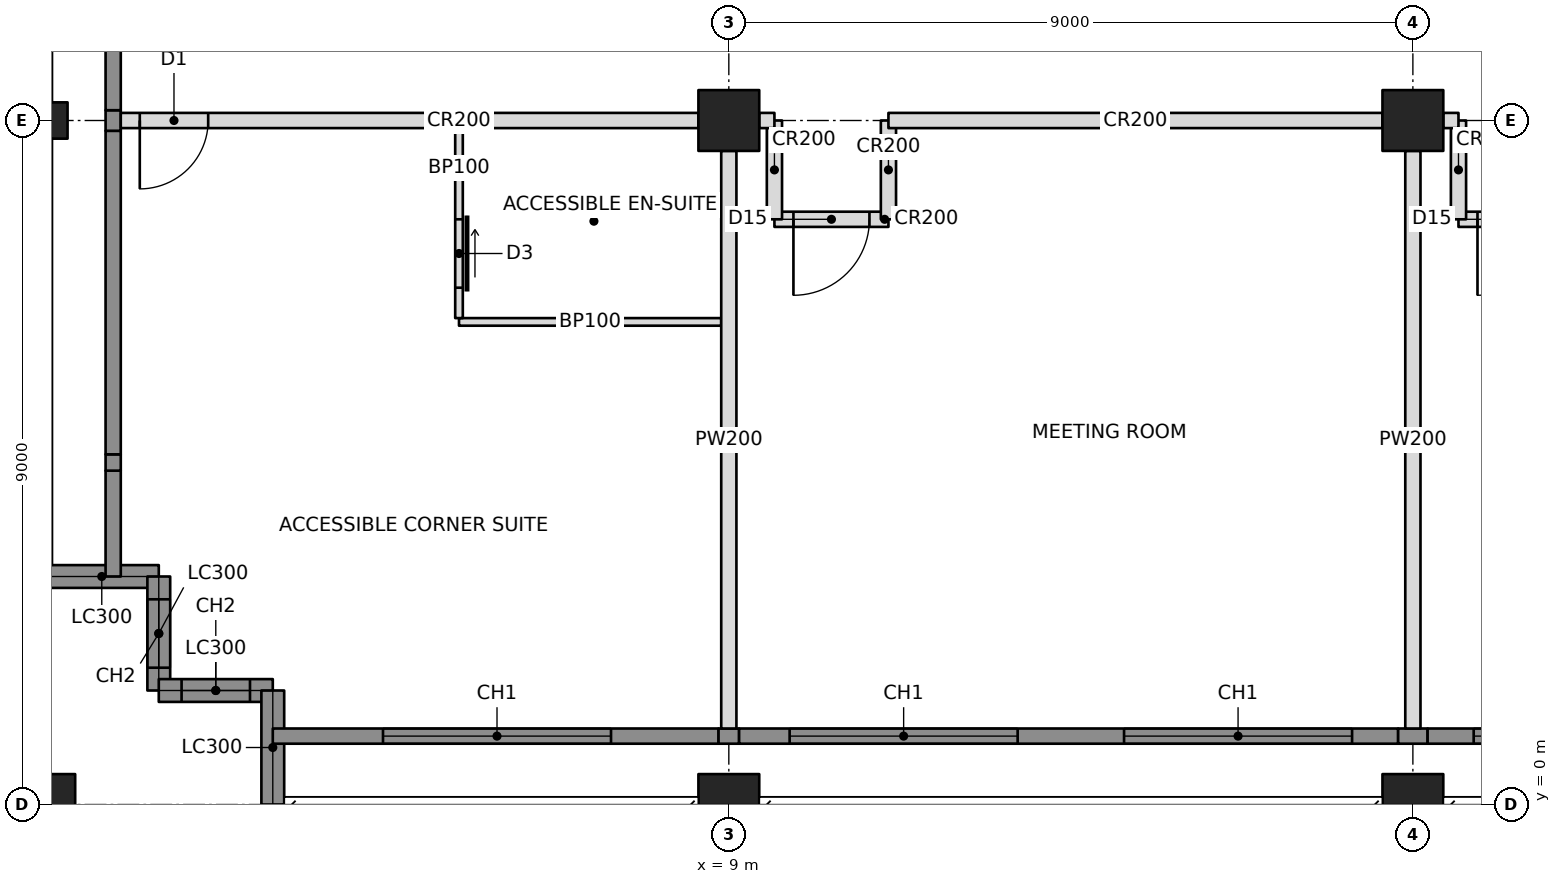
"""IFC4 building model, lengths in metres.
Left out: names, types, materials, properties, quantities, classifications, styles, units other than length and angle.
Written with IfcOpenShell. Run it as: python <this file> out.ifc"""

import sys

from ifc_helpers import new_model, si_unit, direction, frame, frame_2d, origin, origin_with_axes, origin_2d, place, context, subcontext, project, spatial, rectangle, hollow_rectangle, i_section, extrude, element, fill, save


model = new_model("IFC4")
c1 = context("Model", 3, precision=1e-05, world=origin(), true_north=direction((0.0, 1.0)))
c2 = subcontext(c1, "Body", "Model", "MODEL_VIEW")
j1 = project(units=[si_unit("LENGTHUNIT", "METRE"), si_unit("PLANEANGLEUNIT", "RADIAN")], contexts=[c1])
p1 = place(None, origin())
s1 = spatial("IfcSite", under=j1, at=p1, CompositionType="ELEMENT")
p2 = place(p1, origin())
s2 = spatial("IfcBuilding", under=s1, at=p2, CompositionType="ELEMENT")
p3 = place(p2, frame((0.0, 0.0, 28.0)))
s3 = spatial("IfcBuildingStorey", under=s2, at=p3, CompositionType="ELEMENT", Elevation=28.0)
p4 = place(p3, origin_with_axes())
e1 = element("IfcColumn", 1, at=p4, inside=s3, PredefinedType="COLUMN", context=c2, shape_type="SweptSolid", body=[
    extrude(hollow_rectangle(XDim=0.8, YDim=0.8, WallThickness=0.1, at=origin_2d()), origin(), (0.0, 0.0, 1.0), 3.4),
])
p5 = place(p3, frame((0.0, 9.0, 0.0), z_axis=(0.0, 0.0, 1.0), x_axis=(0.0, 1.0, 0.0)))
e2 = element("IfcColumn", 2, at=p5, inside=s3, PredefinedType="COLUMN", context=c2, shape_type="SweptSolid", body=[
    extrude(i_section(OverallWidth=0.478, OverallDepth=0.599, WebThickness=0.1, FlangeThickness=0.14, at=origin_2d()), origin(), (0.0, 0.0, 1.0), 3.4),
])
for number, where, z_axis, x_axis in (
    (3, (9.0, 0.0, 0.0), (0.0, 0.0, 1.0), (1.0, 0.0, 0.0)),
    (4, (9.0, 9.0, 0.0), (0.0, 0.0, 1.0), (1.0, 0.0, 0.0)),
    (5, (18.0, 0.0, 0.0), (0.0, 0.0, 1.0), (1.0, 0.0, 0.0)),
    (6, (18.0, 9.0, 0.0), (0.0, 0.0, 1.0), (1.0, 0.0, 0.0)),
):
    element("IfcColumn", number, at=place(p3, frame(where, z_axis=z_axis, x_axis=x_axis)), inside=s3, PredefinedType="COLUMN", context=c2, shape_type="SweptSolid", body=[
        extrude(hollow_rectangle(XDim=0.8, YDim=0.8, WallThickness=0.1, at=origin_2d()), origin(), (0.0, 0.0, 1.0), 3.4),
    ])
p6 = place(p3, frame((0.0, 3.0, 0.0), z_axis=(0.0, 0.0, 1.0), x_axis=(1.0, 0.0, 0.0)))
e7 = element("IfcWall", 7, at=p6, inside=s3, PredefinedType="SOLIDWALL", context=c2, shape_type="SweptSolid", body=[
    extrude(rectangle(XDim=1.5, YDim=0.3, at=frame_2d((0.75, 0.0))), origin(), (0.0, 0.0, 1.0), 2.42),
])
p7 = place(p3, frame((1.5, 3.0, 0.0), z_axis=(0.0, 0.0, 1.0), x_axis=(0.0, -1.0, 0.0)))
e8 = element("IfcWall", 8, at=p7, inside=s3, PredefinedType="SOLIDWALL", context=c2, shape_type="SweptSolid", body=[
    extrude(rectangle(XDim=1.5, YDim=0.3, at=frame_2d((0.75, 0.0))), origin(), (0.0, 0.0, 1.0), 3.2),
])
p8 = place(p7, frame((0.3, 0.0, 0.6)))
e9 = element("IfcOpeningElement", 9, at=p8, cuts=e8, PredefinedType="OPENING", context=c2, shape_type="SweptSolid", body=[
    extrude(rectangle(XDim=0.9, YDim=2.2, at=frame_2d((0.45, 1.1))), frame((0.0, 0.16, 0.0), z_axis=(0.0, -1.0, 0.0), x_axis=(1.0, 0.0, 0.0)), (0.0, 0.0, 1.0), 0.32),
])
p9 = place(p3, frame((1.5, 1.5, 0.0), z_axis=(0.0, 0.0, 1.0), x_axis=(1.0, 0.0, 0.0)))
e10 = element("IfcWall", 10, at=p9, inside=s3, PredefinedType="SOLIDWALL", context=c2, shape_type="SweptSolid", body=[
    extrude(rectangle(XDim=1.5, YDim=0.3, at=frame_2d((0.75, 0.0))), origin(), (0.0, 0.0, 1.0), 3.2),
])
p10 = place(p9, frame((0.3, 0.0, 0.6)))
e11 = element("IfcOpeningElement", 11, at=p10, cuts=e10, PredefinedType="OPENING", context=c2, shape_type="SweptSolid", body=[
    extrude(rectangle(XDim=0.9, YDim=2.2, at=frame_2d((0.45, 1.1))), frame((0.0, 0.16, 0.0), z_axis=(0.0, -1.0, 0.0), x_axis=(1.0, 0.0, 0.0)), (0.0, 0.0, 1.0), 0.32),
])
p11 = place(p3, frame((3.0, 1.5, 0.0), z_axis=(0.0, 0.0, 1.0), x_axis=(0.0, -1.0, 0.0)))
e12 = element("IfcWall", 12, at=p11, inside=s3, PredefinedType="SOLIDWALL", context=c2, shape_type="SweptSolid", body=[
    extrude(rectangle(XDim=1.5, YDim=0.3, at=frame_2d((0.75, 0.0))), origin(), (0.0, 0.0, 1.0), 2.42),
])
p12 = place(p3, frame((3.0, 0.9, 0.0), z_axis=(0.0, 0.0, 1.0), x_axis=(1.0, 0.0, 0.0)))
e13 = element("IfcWall", 13, at=p12, inside=s3, PredefinedType="SOLIDWALL", context=c2, shape_type="SweptSolid", body=[
    extrude(rectangle(XDim=5.865, YDim=0.2, at=frame_2d((2.932, 0.0))), origin(), (0.0, 0.0, 1.0), 3.2),
])
p13 = place(p12, frame((1.45, 0.0, 0.6)))
e14 = element("IfcOpeningElement", 14, at=p13, cuts=e13, PredefinedType="OPENING", context=c2, shape_type="SweptSolid", body=[
    extrude(rectangle(XDim=3.0, YDim=2.2, at=frame_2d((1.5, 1.1))), frame((0.0, 0.11, 0.0), z_axis=(0.0, -1.0, 0.0), x_axis=(1.0, 0.0, 0.0)), (0.0, 0.0, 1.0), 0.22),
])
p14 = place(p3, frame((0.9, 3.0, 0.0), z_axis=(0.0, 0.0, 1.0), x_axis=(0.0, 1.0, 0.0)))
e15 = element("IfcWall", 15, at=p14, inside=s3, PredefinedType="SOLIDWALL", context=c2, shape_type="SweptSolid", body=[
    extrude(rectangle(XDim=1.393, YDim=0.2, at=frame_2d((0.696, 0.0))), origin(), (0.0, 0.0, 1.0), 3.2),
])
p15 = place(p3, frame((1.0, 9.0, 0.0), z_axis=(0.0, 0.0, 1.0), x_axis=(1.0, 0.0, 0.0)))
e16 = element("IfcWall", 16, at=p15, inside=s3, PredefinedType="PARTITIONING", context=c2, shape_type="SweptSolid", body=[
    extrude(rectangle(XDim=7.6, YDim=0.2, at=frame_2d((3.8, 0.0))), origin(), (0.0, 0.0, 1.0), 2.438),
])
p16 = place(p15, frame((0.25, 0.0, 0.0)))
e17 = element("IfcOpeningElement", 17, at=p16, cuts=e16, PredefinedType="OPENING", context=c2, shape_type="SweptSolid", body=[
    extrude(rectangle(XDim=0.9, YDim=2.1, at=frame_2d((0.45, 1.05))), frame((0.0, 0.11, 0.0), z_axis=(0.0, -1.0, 0.0), x_axis=(1.0, 0.0, 0.0)), (0.0, 0.0, 1.0), 0.22),
])
for number, where, z_axis, x_axis in (
    (18, (9.4, 9.0, 0.0), (0.0, 0.0, 1.0), (1.0, 0.0, 0.0)),
    (19, (18.4, 9.0, 0.0), (0.0, 0.0, 1.0), (1.0, 0.0, 0.0)),
):
    element("IfcWall", number, at=place(p3, frame(where, z_axis=z_axis, x_axis=x_axis)), inside=s3, PredefinedType="PARTITIONING", context=c2, shape_type="SweptSolid", body=[
        extrude(rectangle(XDim=0.2, YDim=0.2, at=frame_2d((0.1, 0.0))), origin(), (0.0, 0.0, 1.0), 2.405),
    ])
p17 = place(p3, frame((9.0, 8.6, 0.0), z_axis=(0.0, 0.0, 1.0), x_axis=(0.0, -1.0, 0.0)))
e20 = element("IfcWall", 20, at=p17, inside=s3, PredefinedType="PARTITIONING", context=c2, shape_type="SweptSolid", body=[
    extrude(rectangle(XDim=7.6, YDim=0.2, at=frame_2d((3.8, 0.0))), origin(), (0.0, 0.0, 1.0), 2.438),
])
p18 = place(p3, frame((18.0, 8.6, 0.0), z_axis=(0.0, 0.0, 1.0), x_axis=(0.0, -1.0, 0.0)))
e21 = element("IfcWall", 21, at=p18, inside=s3, PredefinedType="PARTITIONING", context=c2, shape_type="SweptSolid", body=[
    extrude(rectangle(XDim=7.6, YDim=0.2, at=frame_2d((3.8, 0.0))), origin(), (0.0, 0.0, 1.0), 2.405),
])
p19 = place(p3, frame((5.45, 6.35, 0.0), z_axis=(0.0, 0.0, 1.0), x_axis=(1.0, 0.0, 0.0)))
e22 = element("IfcWall", 22, at=p19, inside=s3, PredefinedType="PARTITIONING", context=c2, shape_type="SweptSolid", body=[
    extrude(rectangle(XDim=3.45, YDim=0.1, at=frame_2d((1.725, 0.0))), origin(), (0.0, 0.0, 1.0), 2.438),
])
p20 = place(p3, frame((5.45, 8.9, 0.0), z_axis=(0.0, 0.0, 1.0), x_axis=(0.0, -1.0, 0.0)))
e23 = element("IfcWall", 23, at=p20, inside=s3, PredefinedType="PARTITIONING", context=c2, shape_type="SweptSolid", body=[
    extrude(rectangle(XDim=2.5, YDim=0.1, at=frame_2d((1.25, 0.0))), origin(), (0.0, 0.0, 1.0), 2.438),
])
p21 = place(p20, frame((1.2, 0.0, 0.0)))
e24 = element("IfcOpeningElement", 24, at=p21, cuts=e23, PredefinedType="OPENING", context=c2, shape_type="SweptSolid", body=[
    extrude(rectangle(XDim=0.9, YDim=2.1, at=frame_2d((0.45, 1.05))), frame((0.0, 0.06, 0.0), z_axis=(0.0, -1.0, 0.0), x_axis=(1.0, 0.0, 0.0)), (0.0, 0.0, 1.0), 0.12),
])
p22 = place(p3, frame((11.1, 9.0, 0.0), z_axis=(0.0, 0.0, 1.0), x_axis=(1.0, 0.0, 0.0)))
e25 = element("IfcWall", 25, at=p22, inside=s3, PredefinedType="PARTITIONING", context=c2, shape_type="SweptSolid", body=[
    extrude(rectangle(XDim=6.5, YDim=0.2, at=frame_2d((3.25, 0.0))), origin(), (0.0, 0.0, 1.0), 2.405),
])
for number, where, z_axis, x_axis in (
    (26, (9.6, 9.0, 0.0), (0.0, 0.0, 1.0), (0.0, -1.0, 0.0)),
    (27, (11.1, 9.0, 0.0), (0.0, 0.0, 1.0), (0.0, -1.0, 0.0)),
):
    element("IfcWall", number, at=place(p3, frame(where, z_axis=z_axis, x_axis=x_axis)), inside=s3, PredefinedType="PARTITIONING", context=c2, shape_type="SweptSolid", body=[
        extrude(rectangle(XDim=1.3, YDim=0.2, at=frame_2d((0.65, 0.0))), origin(), (0.0, 0.0, 1.0), 2.404),
    ])
p23 = place(p3, frame((9.6, 7.7, 0.0), z_axis=(0.0, 0.0, 1.0), x_axis=(1.0, 0.0, 0.0)))
e28 = element("IfcWall", 28, at=p23, inside=s3, PredefinedType="PARTITIONING", context=c2, shape_type="SweptSolid", body=[
    extrude(rectangle(XDim=1.5, YDim=0.2, at=frame_2d((0.75, 0.0))), origin(), (0.0, 0.0, 1.0), 3.2),
])
p24 = place(p23, frame((0.25, 0.0, 0.0)))
e29 = element("IfcOpeningElement", 29, at=p24, cuts=e28, PredefinedType="OPENING", context=c2, shape_type="SweptSolid", body=[
    extrude(rectangle(XDim=1.0, YDim=2.1, at=frame_2d((0.5, 1.05))), frame((0.0, 0.11, 0.0), z_axis=(0.0, -1.0, 0.0), x_axis=(1.0, 0.0, 0.0)), (0.0, 0.0, 1.0), 0.22),
])
p25 = place(p3, frame((18.6, 9.0, 0.0), z_axis=(0.0, 0.0, 1.0), x_axis=(0.0, -1.0, 0.0)))
e30 = element("IfcWall", 30, at=p25, inside=s3, PredefinedType="PARTITIONING", context=c2, shape_type="SweptSolid", body=[
    extrude(rectangle(XDim=1.3, YDim=0.2, at=frame_2d((0.65, 0.0))), origin(), (0.0, 0.0, 1.0), 2.404),
])
p26 = place(p3, frame((18.6, 7.7, 0.0), z_axis=(0.0, 0.0, 1.0), x_axis=(1.0, 0.0, 0.0)))
e31 = element("IfcWall", 31, at=p26, inside=s3, PredefinedType="PARTITIONING", context=c2, shape_type="SweptSolid", body=[
    extrude(rectangle(XDim=1.5, YDim=0.2, at=frame_2d((0.75, 0.0))), origin(), (0.0, 0.0, 1.0), 3.2),
])
p27 = place(p26, frame((0.25, 0.0, 0.0)))
e32 = element("IfcOpeningElement", 32, at=p27, cuts=e31, PredefinedType="OPENING", context=c2, shape_type="SweptSolid", body=[
    extrude(rectangle(XDim=1.0, YDim=2.1, at=frame_2d((0.5, 1.05))), frame((0.0, 0.11, 0.0), z_axis=(0.0, -1.0, 0.0), x_axis=(1.0, 0.0, 0.0)), (0.0, 0.0, 1.0), 0.22),
])
p28 = place(p3, frame((8.865, 0.9, 0.0), z_axis=(0.0, 0.0, 1.0), x_axis=(1.0, 0.0, 0.0)))
e33 = element("IfcWall", 33, at=p28, inside=s3, PredefinedType="SOLIDWALL", context=c2, shape_type="SweptSolid", body=[
    extrude(rectangle(XDim=0.271, YDim=0.2, at=frame_2d((0.135, 0.0))), origin(), (0.0, 0.0, 1.0), 2.438),
])
p29 = place(p3, frame((9.135, 0.9, 0.0), z_axis=(0.0, 0.0, 1.0), x_axis=(1.0, 0.0, 0.0)))
e34 = element("IfcWall", 34, at=p29, inside=s3, PredefinedType="SOLIDWALL", context=c2, shape_type="SweptSolid", body=[
    extrude(rectangle(XDim=8.671, YDim=0.2, at=frame_2d((4.335, 0.0))), origin(), (0.0, 0.0, 1.0), 3.2),
])
p30 = place(p29, frame((0.665, 0.0, 0.6)))
e35 = element("IfcOpeningElement", 35, at=p30, cuts=e34, PredefinedType="OPENING", context=c2, shape_type="SweptSolid", body=[
    extrude(rectangle(XDim=3.0, YDim=2.2, at=frame_2d((1.5, 1.1))), frame((0.0, 0.11, 0.0), z_axis=(0.0, -1.0, 0.0), x_axis=(1.0, 0.0, 0.0)), (0.0, 0.0, 1.0), 0.22),
])
p31 = place(p29, frame((5.065, 0.0, 0.6)))
e36 = element("IfcOpeningElement", 36, at=p31, cuts=e34, PredefinedType="OPENING", context=c2, shape_type="SweptSolid", body=[
    extrude(rectangle(XDim=3.0, YDim=2.2, at=frame_2d((1.5, 1.1))), frame((0.0, 0.11, 0.0), z_axis=(0.0, -1.0, 0.0), x_axis=(1.0, 0.0, 0.0)), (0.0, 0.0, 1.0), 0.22),
])
p32 = place(p3, frame((17.806, 0.9, 0.0), z_axis=(0.0, 0.0, 1.0), x_axis=(1.0, 0.0, 0.0)))
e37 = element("IfcWall", 37, at=p32, inside=s3, PredefinedType="SOLIDWALL", context=c2, shape_type="SweptSolid", body=[
    extrude(rectangle(XDim=0.388, YDim=0.2, at=frame_2d((0.194, 0.0))), origin(), (0.0, 0.0, 1.0), 2.404),
])
p33 = place(p3, frame((18.194, 0.9, 0.0), z_axis=(0.0, 0.0, 1.0), x_axis=(1.0, 0.0, 0.0)))
e38 = element("IfcWall", 38, at=p33, inside=s3, PredefinedType="SOLIDWALL", context=c2, shape_type="SweptSolid", body=[
    extrude(rectangle(XDim=8.612, YDim=0.2, at=frame_2d((4.306, 0.0))), origin(), (0.0, 0.0, 1.0), 3.2),
])
p34 = place(p33, frame((0.606, 0.0, 0.6)))
e39 = element("IfcOpeningElement", 39, at=p34, cuts=e38, PredefinedType="OPENING", context=c2, shape_type="SweptSolid", body=[
    extrude(rectangle(XDim=3.0, YDim=2.2, at=frame_2d((1.5, 1.1))), frame((0.0, 0.11, 0.0), z_axis=(0.0, -1.0, 0.0), x_axis=(1.0, 0.0, 0.0)), (0.0, 0.0, 1.0), 0.22),
])
p35 = place(p33, frame((5.006, 0.0, 0.6)))
e40 = element("IfcOpeningElement", 40, at=p35, cuts=e38, PredefinedType="OPENING", context=c2, shape_type="SweptSolid", body=[
    extrude(rectangle(XDim=3.0, YDim=2.2, at=frame_2d((1.5, 1.1))), frame((0.0, 0.11, 0.0), z_axis=(0.0, -1.0, 0.0), x_axis=(1.0, 0.0, 0.0)), (0.0, 0.0, 1.0), 0.22),
])
p36 = place(p3, frame((0.9, 4.393, 0.0), z_axis=(0.0, 0.0, 1.0), x_axis=(0.0, 1.0, 0.0)))
e41 = element("IfcWall", 41, at=p36, inside=s3, PredefinedType="SOLIDWALL", context=c2, shape_type="SweptSolid", body=[
    extrude(rectangle(XDim=0.215, YDim=0.2, at=frame_2d((0.107, 0.0))), origin(), (0.0, 0.0, 1.0), 2.661),
])
p37 = place(p3, frame((0.9, 4.607, 0.0), z_axis=(0.0, 0.0, 1.0), x_axis=(0.0, 1.0, 0.0)))
e42 = element("IfcWall", 42, at=p37, inside=s3, PredefinedType="SOLIDWALL", context=c2, shape_type="SweptSolid", body=[
    extrude(rectangle(XDim=4.257, YDim=0.2, at=frame_2d((2.129, 0.0))), origin(), (0.0, 0.0, 1.0), 3.2),
])
p38 = place(p3, frame((0.9, 8.865, 0.0), z_axis=(0.0, 0.0, 1.0), x_axis=(0.0, 1.0, 0.0)))
e43 = element("IfcWall", 43, at=p38, inside=s3, PredefinedType="SOLIDWALL", context=c2, shape_type="SweptSolid", body=[
    extrude(rectangle(XDim=0.271, YDim=0.2, at=frame_2d((0.135, 0.0))), origin(), (0.0, 0.0, 1.0), 2.438),
])
p39 = place(p3, frame((0.9, 9.135, 0.0), z_axis=(0.0, 0.0, 1.0), x_axis=(0.0, 1.0, 0.0)))
e44 = element("IfcWall", 44, at=p39, inside=s3, PredefinedType="SOLIDWALL", context=c2, shape_type="SweptSolid", body=[
    extrude(rectangle(XDim=8.671, YDim=0.2, at=frame_2d((4.335, 0.0))), origin(), (0.0, 0.0, 1.0), 3.2),
])
p40 = place(p39, frame((2.015, 0.0, 0.6)))
e45 = element("IfcOpeningElement", 45, at=p40, cuts=e44, PredefinedType="OPENING", context=c2, shape_type="SweptSolid", body=[
    extrude(rectangle(XDim=3.0, YDim=2.2, at=frame_2d((1.5, 1.1))), frame((0.0, 0.11, 0.0), z_axis=(0.0, -1.0, 0.0), x_axis=(1.0, 0.0, 0.0)), (0.0, 0.0, 1.0), 0.22),
])
p41 = place(p39, frame((5.515, 0.0, 0.6)))
e46 = element("IfcOpeningElement", 46, at=p41, cuts=e44, PredefinedType="OPENING", context=c2, shape_type="SweptSolid", body=[
    extrude(rectangle(XDim=3.0, YDim=2.2, at=frame_2d((1.5, 1.1))), frame((0.0, 0.11, 0.0), z_axis=(0.0, -1.0, 0.0), x_axis=(1.0, 0.0, 0.0)), (0.0, 0.0, 1.0), 0.22),
])
p42 = place(p8, origin())
e47 = element("IfcWindow", 47, at=p42, inside=s3, PartitioningType="SINGLE_PANEL", PredefinedType="WINDOW", context=c2, shape_type="SweptSolid", body=[
    extrude(rectangle(XDim=0.9, YDim=2.2, at=frame_2d((0.45, 1.1))), frame((0.0, 0.03, 0.0), z_axis=(0.0, -1.0, 0.0), x_axis=(1.0, 0.0, 0.0)), (0.0, 0.0, 1.0), 0.06),
])
fill(e9, e47)
p43 = place(p10, origin())
e48 = element("IfcWindow", 48, at=p43, inside=s3, PartitioningType="SINGLE_PANEL", PredefinedType="WINDOW", context=c2, shape_type="SweptSolid", body=[
    extrude(rectangle(XDim=0.9, YDim=2.2, at=frame_2d((0.45, 1.1))), frame((0.0, 0.03, 0.0), z_axis=(0.0, -1.0, 0.0), x_axis=(1.0, 0.0, 0.0)), (0.0, 0.0, 1.0), 0.06),
])
fill(e11, e48)
p44 = place(p13, origin())
e49 = element("IfcWindow", 49, at=p44, inside=s3, PartitioningType="TRIPLE_PANEL_VERTICAL", PredefinedType="WINDOW", context=c2, shape_type="SweptSolid", body=[
    extrude(rectangle(XDim=3.0, YDim=2.2, at=frame_2d((1.5, 1.1))), frame((0.0, 0.03, 0.0), z_axis=(0.0, -1.0, 0.0), x_axis=(1.0, 0.0, 0.0)), (0.0, 0.0, 1.0), 0.06),
])
fill(e14, e49)
p45 = place(p30, origin())
e50 = element("IfcWindow", 50, at=p45, inside=s3, PartitioningType="TRIPLE_PANEL_VERTICAL", PredefinedType="WINDOW", context=c2, shape_type="SweptSolid", body=[
    extrude(rectangle(XDim=3.0, YDim=2.2, at=frame_2d((1.5, 1.1))), frame((0.0, 0.03, 0.0), z_axis=(0.0, -1.0, 0.0), x_axis=(1.0, 0.0, 0.0)), (0.0, 0.0, 1.0), 0.06),
])
fill(e35, e50)
p46 = place(p31, origin())
e51 = element("IfcWindow", 51, at=p46, inside=s3, PartitioningType="TRIPLE_PANEL_VERTICAL", PredefinedType="WINDOW", context=c2, shape_type="SweptSolid", body=[
    extrude(rectangle(XDim=3.0, YDim=2.2, at=frame_2d((1.5, 1.1))), frame((0.0, 0.03, 0.0), z_axis=(0.0, -1.0, 0.0), x_axis=(1.0, 0.0, 0.0)), (0.0, 0.0, 1.0), 0.06),
])
fill(e36, e51)
p47 = place(p34, origin())
e52 = element("IfcWindow", 52, at=p47, inside=s3, PartitioningType="TRIPLE_PANEL_VERTICAL", PredefinedType="WINDOW", context=c2, shape_type="SweptSolid", body=[
    extrude(rectangle(XDim=3.0, YDim=2.2, at=frame_2d((1.5, 1.1))), frame((0.0, 0.03, 0.0), z_axis=(0.0, -1.0, 0.0), x_axis=(1.0, 0.0, 0.0)), (0.0, 0.0, 1.0), 0.06),
])
fill(e39, e52)
p48 = place(p21, origin())
e53 = element("IfcDoor", 53, at=p48, inside=s3, OperationType="SLIDING_TO_LEFT", PredefinedType="DOOR", context=c2, shape_type="SweptSolid", body=[
    extrude(rectangle(XDim=0.9, YDim=2.1, at=frame_2d((0.45, 1.05))), frame((0.0, 0.025, 0.0), z_axis=(0.0, -1.0, 0.0), x_axis=(1.0, 0.0, 0.0)), (0.0, 0.0, 1.0), 0.05),
])
fill(e24, e53)
p49 = place(p16, frame((0.9, 0.0, 0.0), z_axis=(0.0, 0.0, 1.0), x_axis=(-1.0, 0.0, 0.0)))
e54 = element("IfcDoor", 54, at=p49, inside=s3, OperationType="SINGLE_SWING_RIGHT", PredefinedType="DOOR", context=c2, shape_type="SweptSolid", body=[
    extrude(rectangle(XDim=0.9, YDim=2.1, at=frame_2d((0.45, 1.05))), frame((0.0, 0.025, 0.0), z_axis=(0.0, -1.0, 0.0), x_axis=(1.0, 0.0, 0.0)), (0.0, 0.0, 1.0), 0.05),
])
fill(e17, e54)
p50 = place(p24, frame((1.0, 0.0, 0.0), z_axis=(0.0, 0.0, 1.0), x_axis=(-1.0, 0.0, 0.0)))
e55 = element("IfcDoor", 55, at=p50, inside=s3, OperationType="SINGLE_SWING_RIGHT", PredefinedType="DOOR", context=c2, shape_type="SweptSolid", body=[
    extrude(rectangle(XDim=1.0, YDim=2.1, at=frame_2d((0.5, 1.05))), frame((0.0, 0.025, 0.0), z_axis=(0.0, -1.0, 0.0), x_axis=(1.0, 0.0, 0.0)), (0.0, 0.0, 1.0), 0.05),
])
fill(e29, e55)
p51 = place(p27, frame((1.0, 0.0, 0.0), z_axis=(0.0, 0.0, 1.0), x_axis=(-1.0, 0.0, 0.0)))
e56 = element("IfcDoor", 56, at=p51, inside=s3, OperationType="SINGLE_SWING_RIGHT", PredefinedType="DOOR", context=c2, shape_type="SweptSolid", body=[
    extrude(rectangle(XDim=1.0, YDim=2.1, at=frame_2d((0.5, 1.05))), frame((0.0, 0.025, 0.0), z_axis=(0.0, -1.0, 0.0), x_axis=(1.0, 0.0, 0.0)), (0.0, 0.0, 1.0), 0.05),
])
fill(e32, e56)
save(model, sys.argv[1])
